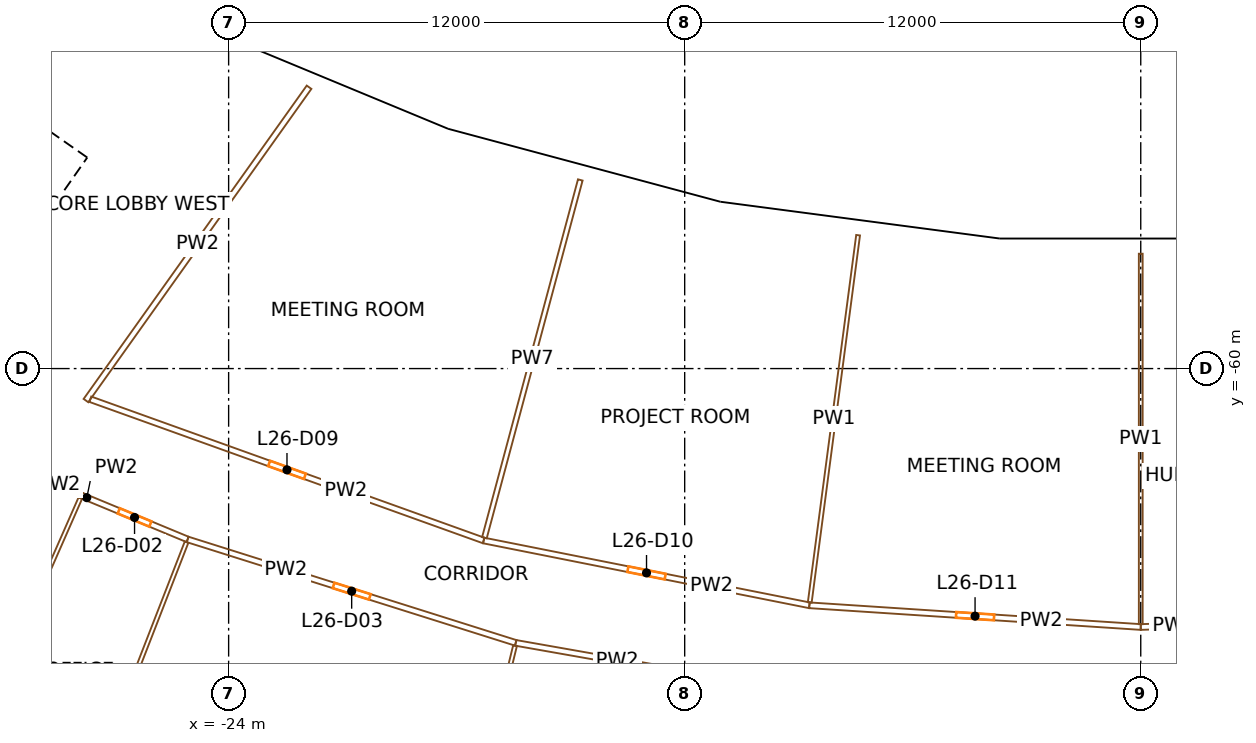
"""IFC4 building model, lengths in metres.
Left out: names, types, materials, properties, quantities, classifications, styles, units other than length and angle.
Written with IfcOpenShell. Run it as: python <this file> out.ifc"""

import sys

from ifc_helpers import new_model, si_unit, direction, frame, frame_2d, origin, origin_2d, place, context, subcontext, project, spatial, rectangle, extrude, element, fill, save


model = new_model("IFC4")
c1 = context("Model", 3, precision=1e-05, world=origin(), true_north=direction((0.0, 1.0)))
c2 = subcontext(c1, "Body", "Model", "MODEL_VIEW")
j1 = project(units=[si_unit("LENGTHUNIT", "METRE"), si_unit("PLANEANGLEUNIT", "RADIAN")], contexts=[c1])
p1 = place(None, origin())
s1 = spatial("IfcSite", under=j1, at=p1, CompositionType="ELEMENT")
p2 = place(p1, origin())
s2 = spatial("IfcBuilding", under=s1, at=p2, CompositionType="ELEMENT")
p3 = place(p2, frame((0.0, 0.0, 117.7)))
s3 = spatial("IfcBuildingStorey", under=s2, at=p3, CompositionType="ELEMENT", Elevation=117.7)
for number, where, z_axis, x_axis in (
    (1, (-25.763, -52.243, 0.0), (0.0, 0.0, 1.0), (0.897, -0.442, 0.0)),
    (2, (-18.724, -55.159, 0.0), (0.0, 0.0, 1.0), (0.947, -0.321, 0.0)),
    (3, (-11.364, -57.131, 0.0), (0.0, 0.0, 1.0), (0.981, -0.195, 0.0)),
    (4, (-3.81, -58.125, 0.0), (0.0, 0.0, 1.0), (0.998, -0.065, 0.0)),
):
    element("IfcColumn", number, at=place(p3, frame(where, z_axis=z_axis, x_axis=x_axis)), inside=s3, PredefinedType="COLUMN", context=c2, shape_type="SweptSolid", body=[
        extrude(rectangle(XDim=1.2, YDim=1.5, at=origin_2d()), origin(), (0.0, 0.0, 1.0), 3.8),
    ])
p4 = place(p3, frame((-36.717, -66.337, 0.0), z_axis=(0.0, 0.0, 1.0), x_axis=(0.573577477574, 0.819151315216, 0.0)))
e5 = element("IfcWall", 5, at=p4, inside=s3, PredefinedType="SHEAR", context=c2, shape_type="SweptSolid", body=[
    extrude(rectangle(XDim=14.8, YDim=0.9, at=frame_2d((7.4, 0.0))), origin(), (0.0, 0.0, 1.0), 3.5),
])
p5 = place(p4, frame((6.2, 0.0, 0.0)))
e6 = element("IfcOpeningElement", 6, at=p5, cuts=e5, PredefinedType="OPENING", context=c2, shape_type="SweptSolid", body=[
    extrude(rectangle(XDim=2.4, YDim=2.1, at=frame_2d((1.2, 1.05))), frame((0.0, 0.46, 0.0), z_axis=(0.0, -1.0, 0.0), x_axis=(1.0, 0.0, 0.0)), (0.0, 0.0, 1.0), 0.92),
])
p6 = place(p3, frame((-28.854, -54.324, 0.0), z_axis=(0.0, 0.0, 1.0), x_axis=(-0.819145767589, 0.573585400304, 0.0)))
e7 = element("IfcWall", 7, at=p6, inside=s3, PredefinedType="SHEAR", context=c2, shape_type="SweptSolid", body=[
    extrude(rectangle(XDim=15.045, YDim=0.9, at=frame_2d((7.523, 0.0))), origin(), (0.0, 0.0, 1.0), 3.5),
])
p7 = place(p6, frame((0.6, 0.0, 0.0)))
e8 = element("IfcOpeningElement", 8, at=p7, cuts=e7, PredefinedType="OPENING", context=c2, shape_type="SweptSolid", body=[
    extrude(rectangle(XDim=1.0, YDim=2.1, at=frame_2d((0.5, 1.05))), frame((0.0, 0.46, 0.0), z_axis=(0.0, -1.0, 0.0), x_axis=(1.0, 0.0, 0.0)), (0.0, 0.0, 1.0), 0.92),
])
p8 = place(p6, frame((3.275, 0.0, 0.0)))
e9 = element("IfcOpeningElement", 9, at=p8, cuts=e7, PredefinedType="OPENING", context=c2, shape_type="SweptSolid", body=[
    extrude(rectangle(XDim=1.0, YDim=2.1, at=frame_2d((0.5, 1.05))), frame((0.0, 0.46, 0.0), z_axis=(0.0, -1.0, 0.0), x_axis=(1.0, 0.0, 0.0)), (0.0, 0.0, 1.0), 0.92),
])
p9 = place(p6, frame((6.225, 0.0, 0.0)))
e10 = element("IfcOpeningElement", 10, at=p9, cuts=e7, PredefinedType="OPENING", context=c2, shape_type="SweptSolid", body=[
    extrude(rectangle(XDim=0.9, YDim=2.1, at=frame_2d((0.45, 1.05))), frame((0.0, 0.46, 0.0), z_axis=(0.0, -1.0, 0.0), x_axis=(1.0, 0.0, 0.0)), (0.0, 0.0, 1.0), 0.92),
])
p10 = place(p6, frame((13.495, 0.0, 0.0)))
e11 = element("IfcOpeningElement", 11, at=p10, cuts=e7, PredefinedType="OPENING", context=c2, shape_type="SweptSolid", body=[
    extrude(rectangle(XDim=1.1, YDim=2.1, at=frame_2d((0.55, 1.05))), frame((0.0, 0.46, 0.0), z_axis=(0.0, -1.0, 0.0), x_axis=(1.0, 0.0, 0.0)), (0.0, 0.0, 1.0), 0.92),
])
p11 = place(p3, frame((-18.267, -53.89, 0.0), z_axis=(0.0, 0.0, 1.0), x_axis=(-0.923879826967, 0.382682721486, 0.0)))
e12 = element("IfcWall", 12, at=p11, inside=s3, PredefinedType="SOLIDWALL", context=c2, shape_type="SweptSolid", body=[
    extrude(rectangle(XDim=7.493, YDim=0.4, at=frame_2d((3.747, 0.0))), origin(), (0.0, 0.0, 1.0), 2.7),
])
p12 = place(p11, frame((4.301, 0.0, 0.9)))
e13 = element("IfcOpeningElement", 13, at=p12, cuts=e12, PredefinedType="OPENING", context=c2, shape_type="SweptSolid", body=[
    extrude(rectangle(XDim=2.6, YDim=1.65, at=frame_2d((1.3, 0.825))), frame((0.0, 0.21, 0.0), z_axis=(0.0, -1.0, 0.0), x_axis=(1.0, 0.0, 0.0)), (0.0, 0.0, 1.0), 0.42),
])
p13 = place(p11, frame((0.592, 0.0, 0.9)))
e14 = element("IfcOpeningElement", 14, at=p13, cuts=e12, PredefinedType="OPENING", context=c2, shape_type="SweptSolid", body=[
    extrude(rectangle(XDim=2.6, YDim=1.65, at=frame_2d((1.3, 0.825))), frame((0.0, 0.21, 0.0), z_axis=(0.0, -1.0, 0.0), x_axis=(1.0, 0.0, 0.0)), (0.0, 0.0, 1.0), 0.42),
])
p14 = place(p3, frame((-11.15, -55.794, 0.0), z_axis=(0.0, 0.0, 1.0), x_axis=(-0.965924597867, 0.258823629594, 0.0)))
e15 = element("IfcWall", 15, at=p14, inside=s3, PredefinedType="SOLIDWALL", context=c2, shape_type="SweptSolid", body=[
    extrude(rectangle(XDim=7.342, YDim=0.4, at=frame_2d((3.671, 0.0))), origin(), (0.0, 0.0, 1.0), 2.7),
])
p15 = place(p14, frame((4.225, 0.0, 0.9)))
e16 = element("IfcOpeningElement", 16, at=p15, cuts=e15, PredefinedType="OPENING", context=c2, shape_type="SweptSolid", body=[
    extrude(rectangle(XDim=2.6, YDim=1.65, at=frame_2d((1.3, 0.825))), frame((0.0, 0.21, 0.0), z_axis=(0.0, -1.0, 0.0), x_axis=(1.0, 0.0, 0.0)), (0.0, 0.0, 1.0), 0.42),
])
p16 = place(p14, frame((0.517, 0.0, 0.9)))
e17 = element("IfcOpeningElement", 17, at=p16, cuts=e15, PredefinedType="OPENING", context=c2, shape_type="SweptSolid", body=[
    extrude(rectangle(XDim=2.6, YDim=1.65, at=frame_2d((1.3, 0.825))), frame((0.0, 0.21, 0.0), z_axis=(0.0, -1.0, 0.0), x_axis=(1.0, 0.0, 0.0)), (0.0, 0.0, 1.0), 0.42),
])
p17 = place(p3, frame((-3.697, -56.782, 0.0), z_axis=(0.0, 0.0, 1.0), x_axis=(-0.991444533306, 0.130528684121, 0.0)))
e18 = element("IfcWall", 18, at=p17, inside=s3, PredefinedType="SOLIDWALL", context=c2, shape_type="SweptSolid", body=[
    extrude(rectangle(XDim=7.493, YDim=0.4, at=frame_2d((3.747, 0.0))), origin(), (0.0, 0.0, 1.0), 2.7),
])
p18 = place(p17, frame((4.301, 0.0, 0.9)))
e19 = element("IfcOpeningElement", 19, at=p18, cuts=e18, PredefinedType="OPENING", context=c2, shape_type="SweptSolid", body=[
    extrude(rectangle(XDim=2.6, YDim=1.65, at=frame_2d((1.3, 0.825))), frame((0.0, 0.21, 0.0), z_axis=(0.0, -1.0, 0.0), x_axis=(1.0, 0.0, 0.0)), (0.0, 0.0, 1.0), 0.42),
])
p19 = place(p17, frame((0.592, 0.0, 0.9)))
e20 = element("IfcOpeningElement", 20, at=p19, cuts=e18, PredefinedType="OPENING", context=c2, shape_type="SweptSolid", body=[
    extrude(rectangle(XDim=2.6, YDim=1.65, at=frame_2d((1.3, 0.825))), frame((0.0, 0.21, 0.0), z_axis=(0.0, -1.0, 0.0), x_axis=(1.0, 0.0, 0.0)), (0.0, 0.0, 1.0), 0.42),
])
p20 = place(p3, frame((3.671, -56.779, 0.0), z_axis=(0.0, 0.0, 1.0), x_axis=(-1.0, 0.0, 0.0)))
e21 = element("IfcWall", 21, at=p20, inside=s3, PredefinedType="SOLIDWALL", context=c2, shape_type="SweptSolid", body=[
    extrude(rectangle(XDim=7.341, YDim=0.4, at=frame_2d((3.671, 0.0))), origin(), (0.0, 0.0, 1.0), 2.7),
])
p21 = place(p20, frame((4.225, 0.0, 0.9)))
e22 = element("IfcOpeningElement", 22, at=p21, cuts=e21, PredefinedType="OPENING", context=c2, shape_type="SweptSolid", body=[
    extrude(rectangle(XDim=2.6, YDim=1.65, at=frame_2d((1.3, 0.825))), frame((0.0, 0.21, 0.0), z_axis=(0.0, -1.0, 0.0), x_axis=(1.0, 0.0, 0.0)), (0.0, 0.0, 1.0), 0.42),
])
p22 = place(p20, frame((0.517, 0.0, 0.9)))
e23 = element("IfcOpeningElement", 23, at=p22, cuts=e21, PredefinedType="OPENING", context=c2, shape_type="SweptSolid", body=[
    extrude(rectangle(XDim=2.6, YDim=1.65, at=frame_2d((1.3, 0.825))), frame((0.0, 0.21, 0.0), z_axis=(0.0, -1.0, 0.0), x_axis=(1.0, 0.0, 0.0)), (0.0, 0.0, 1.0), 0.42),
])
p23 = place(p3, frame((-31.799, -72.262, 0.0), z_axis=(0.0, 0.0, 1.0), x_axis=(0.402773288685, 0.915299774894, 0.0)))
e24 = element("IfcWall", 24, at=p23, inside=s3, PredefinedType="PARTITIONING", context=c2, shape_type="SweptSolid", body=[
    extrude(rectangle(XDim=9.674, YDim=0.1, at=frame_2d((4.837, 0.0))), origin(), (0.0, 0.0, 1.0), 2.4),
])
p24 = place(p3, frame((-29.059, -62.802, 0.0), z_axis=(0.0, 0.0, 1.0), x_axis=(0.911173247906, -0.412023436592, 0.0)))
e25 = element("IfcWall", 25, at=p24, inside=s3, PredefinedType="PARTITIONING", context=c2, shape_type="SweptSolid", body=[
    extrude(rectangle(XDim=1.303, YDim=0.15, at=frame_2d((0.651, 0.0))), origin(), (0.0, 0.0, 1.0), 2.4),
])
p25 = place(p3, frame((-28.612, -73.582, 0.0), z_axis=(0.0, 0.0, 1.0), x_axis=(0.362392675792, 0.93202550852, 0.0)))
e26 = element("IfcWall", 26, at=p25, inside=s3, PredefinedType="PARTITIONING", context=c2, shape_type="SweptSolid", body=[
    extrude(rectangle(XDim=9.674, YDim=0.1, at=frame_2d((4.837, 0.0))), origin(), (0.0, 0.0, 1.0), 2.4),
])
p26 = place(p3, frame((-25.079, -64.496, 0.0), z_axis=(0.0, 0.0, 1.0), x_axis=(-0.923896753446, 0.382641854705, 0.0)))
e27 = element("IfcWall", 27, at=p26, inside=s3, PredefinedType="PARTITIONING", context=c2, shape_type="SweptSolid", body=[
    extrude(rectangle(XDim=3.023, YDim=0.15, at=frame_2d((1.511, 0.0))), origin(), (0.0, 0.0, 1.0), 2.4),
])
p27 = place(p26, frame((1.062, 0.0, 0.0)))
e28 = element("IfcOpeningElement", 28, at=p27, cuts=e27, PredefinedType="OPENING", context=c2, shape_type="SweptSolid", body=[
    extrude(rectangle(XDim=0.9, YDim=2.1, at=frame_2d((0.45, 1.05))), frame((0.0, 0.085, 0.0), z_axis=(0.0, -1.0, 0.0), x_axis=(1.0, 0.0, 0.0)), (0.0, 0.0, 1.0), 0.17),
])
p28 = place(p3, frame((-27.64, -60.807, 0.0), z_axis=(0.0, 0.0, 1.0), x_axis=(0.941150861554, -0.337986768669, 0.0)))
e29 = element("IfcWall", 29, at=p28, inside=s3, PredefinedType="PARTITIONING", context=c2, shape_type="SweptSolid", body=[
    extrude(rectangle(XDim=10.998, YDim=0.15, at=frame_2d((5.499, 0.0))), origin(), (0.0, 0.0, 1.0), 2.4),
])
p29 = place(p28, frame((4.999, 0.0, 0.0)))
e30 = element("IfcOpeningElement", 30, at=p29, cuts=e29, PredefinedType="OPENING", context=c2, shape_type="SweptSolid", body=[
    extrude(rectangle(XDim=1.0, YDim=2.1, at=frame_2d((0.5, 1.05))), frame((0.0, 0.085, 0.0), z_axis=(0.0, -1.0, 0.0), x_axis=(1.0, 0.0, 0.0)), (0.0, 0.0, 1.0), 0.17),
])
p30 = place(p3, frame((-16.446, -67.217, 0.0), z_axis=(0.0, 0.0, 1.0), x_axis=(-0.953724416281, 0.300682120834, 0.0)))
e31 = element("IfcWall", 31, at=p30, inside=s3, PredefinedType="PARTITIONING", context=c2, shape_type="SweptSolid", body=[
    extrude(rectangle(XDim=9.052, YDim=0.15, at=frame_2d((4.526, 0.0))), origin(), (0.0, 0.0, 1.0), 2.4),
])
p31 = place(p30, frame((4.026, 0.0, 0.0)))
e32 = element("IfcOpeningElement", 32, at=p31, cuts=e31, PredefinedType="OPENING", context=c2, shape_type="SweptSolid", body=[
    extrude(rectangle(XDim=1.0, YDim=2.1, at=frame_2d((0.5, 1.05))), frame((0.0, 0.085, 0.0), z_axis=(0.0, -1.0, 0.0), x_axis=(1.0, 0.0, 0.0)), (0.0, 0.0, 1.0), 0.17),
])
p32 = place(p3, frame((-21.884, -52.598, 0.0), z_axis=(0.0, 0.0, 1.0), x_axis=(-0.580016763963, -0.814604538118, 0.0)))
e33 = element("IfcWall", 33, at=p32, inside=s3, PredefinedType="PARTITIONING", context=c2, shape_type="SweptSolid", body=[
    extrude(rectangle(XDim=10.121, YDim=0.15, at=frame_2d((5.061, 0.0))), origin(), (0.0, 0.0, 1.0), 2.4),
])
p33 = place(p3, frame((-18.763, -76.687, 0.0), z_axis=(0.0, 0.0, 1.0), x_axis=(0.237657357205, 0.971349051869, 0.0)))
e34 = element("IfcWall", 34, at=p33, inside=s3, PredefinedType="PARTITIONING", context=c2, shape_type="SweptSolid", body=[
    extrude(rectangle(XDim=9.674, YDim=0.1, at=frame_2d((4.837, 0.0))), origin(), (0.0, 0.0, 1.0), 2.4),
])
p34 = place(p3, frame((-17.289, -64.524, 0.0), z_axis=(0.0, 0.0, 1.0), x_axis=(0.980786466832, -0.195084357342, 0.0)))
e35 = element("IfcWall", 35, at=p34, inside=s3, PredefinedType="PARTITIONING", context=c2, shape_type="SweptSolid", body=[
    extrude(rectangle(XDim=8.738, YDim=0.15, at=frame_2d((4.369, 0.0))), origin(), (0.0, 0.0, 1.0), 2.4),
])
p35 = place(p34, frame((3.869, 0.0, 0.0)))
e36 = element("IfcOpeningElement", 36, at=p35, cuts=e35, PredefinedType="OPENING", context=c2, shape_type="SweptSolid", body=[
    extrude(rectangle(XDim=1.0, YDim=2.1, at=frame_2d((0.5, 1.05))), frame((0.0, 0.085, 0.0), z_axis=(0.0, -1.0, 0.0), x_axis=(1.0, 0.0, 0.0)), (0.0, 0.0, 1.0), 0.17),
])
p36 = place(p3, frame((-7.532, -68.789, 0.0), z_axis=(0.0, 0.0, 1.0), x_axis=(-0.984813412134, 0.173616080133, 0.0)))
e37 = element("IfcWall", 37, at=p36, inside=s3, PredefinedType="PARTITIONING", context=c2, shape_type="SweptSolid", body=[
    extrude(rectangle(XDim=9.052, YDim=0.15, at=frame_2d((4.526, 0.0))), origin(), (0.0, 0.0, 1.0), 2.4),
])
p37 = place(p36, frame((4.026, 0.0, 0.0)))
e38 = element("IfcOpeningElement", 38, at=p37, cuts=e37, PredefinedType="OPENING", context=c2, shape_type="SweptSolid", body=[
    extrude(rectangle(XDim=1.0, YDim=2.1, at=frame_2d((0.5, 1.05))), frame((0.0, 0.085, 0.0), z_axis=(0.0, -1.0, 0.0), x_axis=(1.0, 0.0, 0.0)), (0.0, 0.0, 1.0), 0.17),
])
p38 = place(p3, frame((-14.747, -55.037, 0.0), z_axis=(0.0, 0.0, 1.0), x_axis=(-0.258833329344, -0.965921998725, 0.0)))
e39 = element("IfcWall", 39, at=p38, inside=s3, PredefinedType="MOVABLE", context=c2, shape_type="SweptSolid", body=[
    extrude(rectangle(XDim=9.746, YDim=0.125, at=frame_2d((4.873, 0.0))), origin(), (0.0, 0.0, 1.0), 2.4),
])
p39 = place(p3, frame((-8.719, -66.229, 0.0), z_axis=(0.0, 0.0, 1.0), x_axis=(0.997858593599, -0.065408158359, 0.0)))
e40 = element("IfcWall", 40, at=p39, inside=s3, PredefinedType="PARTITIONING", context=c2, shape_type="SweptSolid", body=[
    extrude(rectangle(XDim=8.738, YDim=0.15, at=frame_2d((4.369, 0.0))), origin(), (0.0, 0.0, 1.0), 2.4),
])
p40 = place(p39, frame((3.869, 0.0, 0.0)))
e41 = element("IfcOpeningElement", 41, at=p40, cuts=e40, PredefinedType="OPENING", context=c2, shape_type="SweptSolid", body=[
    extrude(rectangle(XDim=1.0, YDim=2.1, at=frame_2d((0.5, 1.05))), frame((0.0, 0.085, 0.0), z_axis=(0.0, -1.0, 0.0), x_axis=(1.0, 0.0, 0.0)), (0.0, 0.0, 1.0), 0.17),
])
p41 = place(p3, frame((-7.437, -56.491, 0.0), z_axis=(0.0, 0.0, 1.0), x_axis=(-0.13053421433, -0.99144380521, 0.0)))
e42 = element("IfcWall", 42, at=p41, inside=s3, PredefinedType="PARTITIONING", context=c2, shape_type="SweptSolid", body=[
    extrude(rectangle(XDim=9.746, YDim=0.1, at=frame_2d((4.873, 0.0))), origin(), (0.0, 0.0, 1.0), 2.4),
])
p42 = place(p3, frame((0.0, -66.8, 0.0), z_axis=(0.0, 0.0, 1.0), x_axis=(0.99946426167, 0.03272903366, 0.0)))
e43 = element("IfcWall", 43, at=p42, inside=s3, PredefinedType="PARTITIONING", context=c2, shape_type="SweptSolid", body=[
    extrude(rectangle(XDim=4.371, YDim=0.15, at=frame_2d((2.186, 0.0))), origin(), (0.0, 0.0, 1.0), 2.4),
])
p43 = place(p42, frame((1.736, 0.0, 0.0)))
e44 = element("IfcOpeningElement", 44, at=p43, cuts=e43, PredefinedType="OPENING", context=c2, shape_type="SweptSolid", body=[
    extrude(rectangle(XDim=0.9, YDim=2.1, at=frame_2d((0.45, 1.05))), frame((0.0, 0.085, 0.0), z_axis=(0.0, -1.0, 0.0), x_axis=(1.0, 0.0, 0.0)), (0.0, 0.0, 1.0), 0.17),
])
p44 = place(p3, frame((0.0, -56.979, 0.0), z_axis=(0.0, 0.0, 1.0), x_axis=(0.0, -1.0, 0.0)))
e45 = element("IfcWall", 45, at=p44, inside=s3, PredefinedType="PARTITIONING", context=c2, shape_type="SweptSolid", body=[
    extrude(rectangle(XDim=9.747, YDim=0.1, at=frame_2d((4.873, 0.0))), origin(), (0.0, 0.0, 1.0), 2.4),
])
p45 = place(p12, origin())
e46 = element("IfcWindow", 46, at=p45, inside=s3, PartitioningType="SINGLE_PANEL", PredefinedType="WINDOW", context=c2, shape_type="SweptSolid", body=[
    extrude(rectangle(XDim=2.6, YDim=1.65, at=frame_2d((1.3, 0.825))), frame((0.0, 0.03, 0.0), z_axis=(0.0, -1.0, 0.0), x_axis=(1.0, 0.0, 0.0)), (0.0, 0.0, 1.0), 0.06),
])
fill(e13, e46)
p46 = place(p13, origin())
e47 = element("IfcWindow", 47, at=p46, inside=s3, PartitioningType="SINGLE_PANEL", PredefinedType="WINDOW", context=c2, shape_type="SweptSolid", body=[
    extrude(rectangle(XDim=2.6, YDim=1.65, at=frame_2d((1.3, 0.825))), frame((0.0, 0.03, 0.0), z_axis=(0.0, -1.0, 0.0), x_axis=(1.0, 0.0, 0.0)), (0.0, 0.0, 1.0), 0.06),
])
fill(e14, e47)
p47 = place(p15, origin())
e48 = element("IfcWindow", 48, at=p47, inside=s3, PartitioningType="SINGLE_PANEL", PredefinedType="WINDOW", context=c2, shape_type="SweptSolid", body=[
    extrude(rectangle(XDim=2.6, YDim=1.65, at=frame_2d((1.3, 0.825))), frame((0.0, 0.03, 0.0), z_axis=(0.0, -1.0, 0.0), x_axis=(1.0, 0.0, 0.0)), (0.0, 0.0, 1.0), 0.06),
])
fill(e16, e48)
p48 = place(p16, origin())
e49 = element("IfcWindow", 49, at=p48, inside=s3, PartitioningType="SINGLE_PANEL", PredefinedType="WINDOW", context=c2, shape_type="SweptSolid", body=[
    extrude(rectangle(XDim=2.6, YDim=1.65, at=frame_2d((1.3, 0.825))), frame((0.0, 0.03, 0.0), z_axis=(0.0, -1.0, 0.0), x_axis=(1.0, 0.0, 0.0)), (0.0, 0.0, 1.0), 0.06),
])
fill(e17, e49)
p49 = place(p18, origin())
e50 = element("IfcWindow", 50, at=p49, inside=s3, PartitioningType="SINGLE_PANEL", PredefinedType="WINDOW", context=c2, shape_type="SweptSolid", body=[
    extrude(rectangle(XDim=2.6, YDim=1.65, at=frame_2d((1.3, 0.825))), frame((0.0, 0.03, 0.0), z_axis=(0.0, -1.0, 0.0), x_axis=(1.0, 0.0, 0.0)), (0.0, 0.0, 1.0), 0.06),
])
fill(e19, e50)
p50 = place(p19, origin())
e51 = element("IfcWindow", 51, at=p50, inside=s3, PartitioningType="SINGLE_PANEL", PredefinedType="WINDOW", context=c2, shape_type="SweptSolid", body=[
    extrude(rectangle(XDim=2.6, YDim=1.65, at=frame_2d((1.3, 0.825))), frame((0.0, 0.03, 0.0), z_axis=(0.0, -1.0, 0.0), x_axis=(1.0, 0.0, 0.0)), (0.0, 0.0, 1.0), 0.06),
])
fill(e20, e51)
p51 = place(p21, origin())
e52 = element("IfcWindow", 52, at=p51, inside=s3, PartitioningType="SINGLE_PANEL", PredefinedType="WINDOW", context=c2, shape_type="SweptSolid", body=[
    extrude(rectangle(XDim=2.6, YDim=1.65, at=frame_2d((1.3, 0.825))), frame((0.0, 0.03, 0.0), z_axis=(0.0, -1.0, 0.0), x_axis=(1.0, 0.0, 0.0)), (0.0, 0.0, 1.0), 0.06),
])
fill(e22, e52)
p52 = place(p22, origin())
e53 = element("IfcWindow", 53, at=p52, inside=s3, PartitioningType="SINGLE_PANEL", PredefinedType="WINDOW", context=c2, shape_type="SweptSolid", body=[
    extrude(rectangle(XDim=2.6, YDim=1.65, at=frame_2d((1.3, 0.825))), frame((0.0, 0.03, 0.0), z_axis=(0.0, -1.0, 0.0), x_axis=(1.0, 0.0, 0.0)), (0.0, 0.0, 1.0), 0.06),
])
fill(e23, e53)
p53 = place(p27, origin())
e54 = element("IfcDoor", 54, at=p53, inside=s3, OperationType="SINGLE_SWING_RIGHT", PredefinedType="DOOR", context=c2, shape_type="SweptSolid", body=[
    extrude(rectangle(XDim=0.9, YDim=2.1, at=frame_2d((0.45, 1.05))), frame((0.0, 0.025, 0.0), z_axis=(0.0, -1.0, 0.0), x_axis=(1.0, 0.0, 0.0)), (0.0, 0.0, 1.0), 0.05),
])
fill(e28, e54)
p54 = place(p31, origin())
e55 = element("IfcDoor", 55, at=p54, inside=s3, OperationType="SINGLE_SWING_RIGHT", PredefinedType="DOOR", context=c2, shape_type="SweptSolid", body=[
    extrude(rectangle(XDim=1.0, YDim=2.1, at=frame_2d((0.5, 1.05))), frame((0.0, 0.025, 0.0), z_axis=(0.0, -1.0, 0.0), x_axis=(1.0, 0.0, 0.0)), (0.0, 0.0, 1.0), 0.05),
])
fill(e32, e55)
p55 = place(p29, origin())
e56 = element("IfcDoor", 56, at=p55, inside=s3, OperationType="SINGLE_SWING_RIGHT", PredefinedType="DOOR", context=c2, shape_type="SweptSolid", body=[
    extrude(rectangle(XDim=1.0, YDim=2.1, at=frame_2d((0.5, 1.05))), frame((0.0, 0.025, 0.0), z_axis=(0.0, -1.0, 0.0), x_axis=(1.0, 0.0, 0.0)), (0.0, 0.0, 1.0), 0.05),
])
fill(e30, e56)
p56 = place(p35, origin())
e57 = element("IfcDoor", 57, at=p56, inside=s3, OperationType="SINGLE_SWING_RIGHT", PredefinedType="DOOR", context=c2, shape_type="SweptSolid", body=[
    extrude(rectangle(XDim=1.0, YDim=2.1, at=frame_2d((0.5, 1.05))), frame((0.0, 0.025, 0.0), z_axis=(0.0, -1.0, 0.0), x_axis=(1.0, 0.0, 0.0)), (0.0, 0.0, 1.0), 0.05),
])
fill(e36, e57)
p57 = place(p40, origin())
e58 = element("IfcDoor", 58, at=p57, inside=s3, OperationType="SINGLE_SWING_RIGHT", PredefinedType="DOOR", context=c2, shape_type="SweptSolid", body=[
    extrude(rectangle(XDim=1.0, YDim=2.1, at=frame_2d((0.5, 1.05))), frame((0.0, 0.025, 0.0), z_axis=(0.0, -1.0, 0.0), x_axis=(1.0, 0.0, 0.0)), (0.0, 0.0, 1.0), 0.05),
])
fill(e41, e58)
save(model, sys.argv[1])
